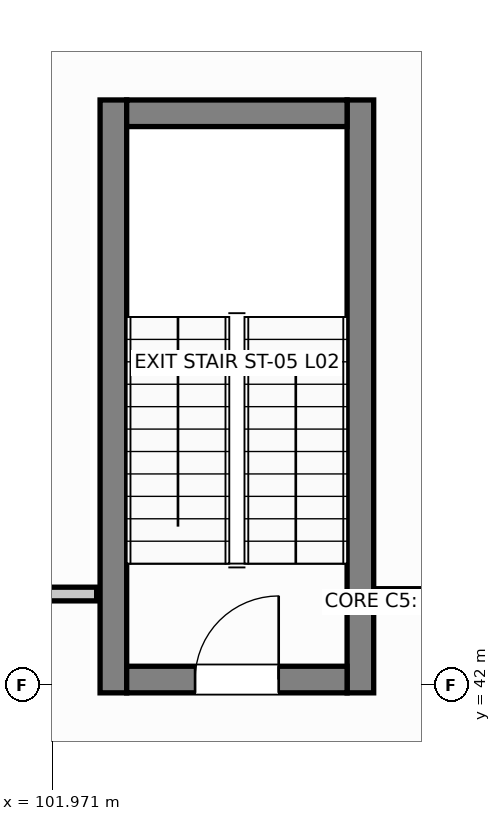
"""IFC4 building model, lengths in metres.
Left out: names, types, materials, properties, quantities, classifications, styles, units other than length and angle.
Written with IfcOpenShell. Run it as: python <this file> out.ifc"""

import sys

from ifc_helpers import new_model, si_unit, direction, frame, frame_2d, origin, place, context, subcontext, project, spatial, rectangle, extrude, element, fill, save


model = new_model("IFC4")
c1 = context("Model", 3, precision=1e-05, world=origin(), true_north=direction((0.0, 1.0)))
c2 = subcontext(c1, "Body", "Model", "MODEL_VIEW")
j1 = project(units=[si_unit("LENGTHUNIT", "METRE"), si_unit("PLANEANGLEUNIT", "RADIAN")], contexts=[c1])
p1 = place(None, origin())
s1 = spatial("IfcSite", under=j1, at=p1, CompositionType="ELEMENT")
p2 = place(p1, origin())
s2 = spatial("IfcBuilding", under=s1, at=p2, CompositionType="ELEMENT")
p3 = place(p2, frame((0.0, 0.0, 9.0)))
s3 = spatial("IfcBuildingStorey", under=s2, at=p3, CompositionType="ELEMENT", Elevation=9.0)
for number, where, z_axis, x_axis in (
    (1, (102.775, 41.9, 0.0), (0.0, 0.0, 1.0), (0.0, 1.0, 0.0)),
    (2, (106.025, 41.9, 0.0), (0.0, 0.0, 1.0), (0.0, 1.0, 0.0)),
):
    element("IfcWall", number, at=place(p3, frame(where, z_axis=z_axis, x_axis=x_axis)), inside=s3, PredefinedType="SHEAR", context=c2, shape_type="SweptSolid", body=[
        extrude(rectangle(XDim=7.8, YDim=0.35, at=frame_2d((3.9, 0.0))), origin(), (0.0, 0.0, 1.0), 3.99),
    ])
p4 = place(p3, frame((102.95, 49.525, 0.0), z_axis=(0.0, 0.0, 1.0), x_axis=(1.0, 0.0, 0.0)))
e3 = element("IfcWall", 3, at=p4, inside=s3, PredefinedType="SHEAR", context=c2, shape_type="SweptSolid", body=[
    extrude(rectangle(XDim=2.9, YDim=0.35, at=frame_2d((1.45, 0.0))), origin(), (0.0, 0.0, 1.0), 3.99),
])
p5 = place(p3, frame((102.95, 42.075, 0.0), z_axis=(0.0, 0.0, 1.0), x_axis=(1.0, 0.0, 0.0)))
e4 = element("IfcWall", 4, at=p5, inside=s3, PredefinedType="SHEAR", context=c2, shape_type="SweptSolid", body=[
    extrude(rectangle(XDim=2.9, YDim=0.35, at=frame_2d((1.45, 0.0))), origin(), (0.0, 0.0, 1.0), 3.99),
])
p6 = place(p5, frame((0.9, 0.0, 0.0)))
e5 = element("IfcOpeningElement", 5, at=p6, cuts=e4, PredefinedType="OPENING", context=c2, shape_type="SweptSolid", body=[
    extrude(rectangle(XDim=1.1, YDim=2.15, at=frame_2d((0.55, 1.075))), frame((0.0, 0.185, 0.0), z_axis=(0.0, -1.0, 0.0), x_axis=(1.0, 0.0, 0.0)), (0.0, 0.0, 1.0), 0.37),
])
p7 = place(p3, frame((102.555, 43.2, 0.0), z_axis=(0.0, 0.0, 1.0), x_axis=(-1.0, 0.0, 0.0)))
e6 = element("IfcWall", 6, at=p7, inside=s3, PredefinedType="PARTITIONING", context=c2, shape_type="SweptSolid", body=[
    extrude(rectangle(XDim=8.615, YDim=0.18, at=frame_2d((4.308, 0.0))), origin(), (0.0, 0.0, 1.0), 3.485),
])
p8 = place(p3, frame((107.22, 43.2, 0.0), z_axis=(0.0, 0.0, 1.0), x_axis=(-1.0, 0.0, 0.0)))
e7 = element("IfcWall", 7, at=p8, inside=s3, PredefinedType="PARTITIONING", context=c2, shape_type="SweptSolid", body=[
    extrude(rectangle(XDim=0.975, YDim=0.14, at=frame_2d((0.487, 0.0))), origin(), (0.0, 0.0, 1.0), 3.945),
])
p9 = place(p6, origin())
e8 = element("IfcDoor", 8, at=p9, inside=s3, OperationType="SINGLE_SWING_RIGHT", PredefinedType="DOOR", context=c2, shape_type="SweptSolid", body=[
    extrude(rectangle(XDim=1.1, YDim=2.15, at=frame_2d((0.55, 1.075))), frame((0.0, 0.025, 0.0), z_axis=(0.0, -1.0, 0.0), x_axis=(1.0, 0.0, 0.0)), (0.0, 0.0, 1.0), 0.05),
])
fill(e5, e8)
save(model, sys.argv[1])
